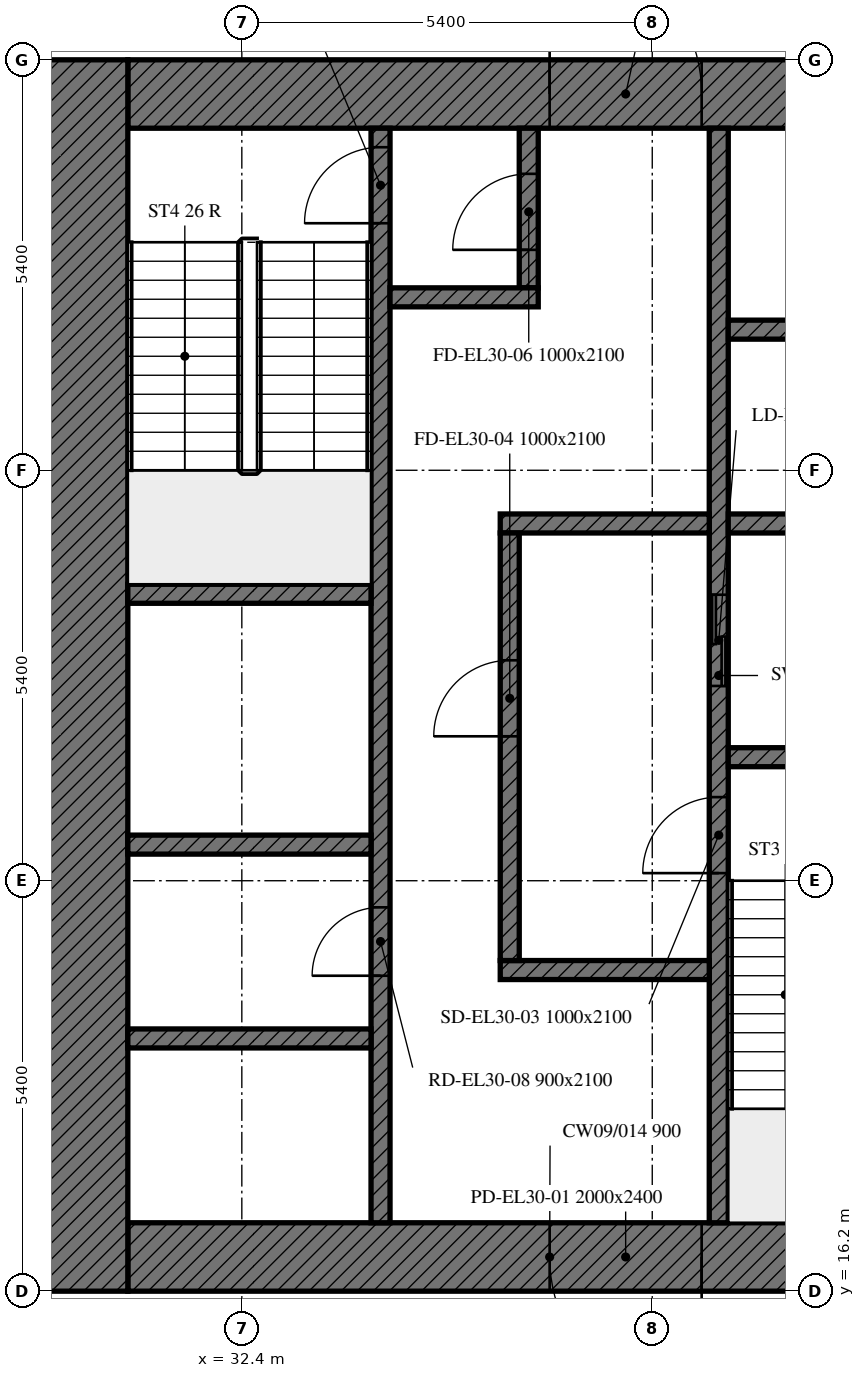
"""IFC4 building model, lengths in metres.
Left out: names, types, materials, properties, quantities, classifications, styles, units other than length and angle.
Written with IfcOpenShell. Run it as: python <this file> out.ifc"""

import sys

from ifc_helpers import new_model, si_unit, direction, frame, frame_2d, origin, place, context, subcontext, project, spatial, rectangle, extrude, element, fill, save


model = new_model("IFC4")
c1 = context("Model", 3, precision=1e-05, world=origin(), true_north=direction((0.0, 1.0)))
c2 = subcontext(c1, "Body", "Model", "MODEL_VIEW")
j1 = project(units=[si_unit("LENGTHUNIT", "METRE"), si_unit("PLANEANGLEUNIT", "RADIAN")], contexts=[c1])
p1 = place(None, origin())
s1 = spatial("IfcSite", under=j1, at=p1, CompositionType="ELEMENT")
p2 = place(p1, origin())
s2 = spatial("IfcBuilding", under=s1, at=p2, CompositionType="ELEMENT")
p3 = place(p2, frame((0.0, 0.0, 125.8)))
s3 = spatial("IfcBuildingStorey", under=s2, at=p3, CompositionType="ELEMENT", Elevation=125.8)
p4 = place(p3, frame((42.0, 16.65, 0.0), z_axis=(0.0, 0.0, 1.0), x_axis=(-1.0, 0.0, 0.0)))
e1 = element("IfcWall", 1, at=p4, inside=s3, PredefinedType="SOLIDWALL", context=c2, shape_type="SweptSolid", body=[
    extrude(rectangle(XDim=11.1, YDim=0.9, at=frame_2d((5.55, 0.0))), origin(), (0.0, 0.0, 1.0), 4.5),
])
p5 = place(p4, frame((3.55, 0.0, 0.0)))
e2 = element("IfcOpeningElement", 2, at=p5, cuts=e1, PredefinedType="OPENING", context=c2, shape_type="SweptSolid", body=[
    extrude(rectangle(XDim=2.0, YDim=2.4, at=frame_2d((1.0, 1.2))), frame((0.0, 0.45, 0.0), z_axis=(0.0, -1.0, 0.0), x_axis=(1.0, 0.0, 0.0)), (0.0, 0.0, 1.0), 0.9),
])
p6 = place(p3, frame((30.9, 31.95, 0.0), z_axis=(0.0, 0.0, 1.0), x_axis=(1.0, 0.0, 0.0)))
e3 = element("IfcWall", 3, at=p6, inside=s3, PredefinedType="SOLIDWALL", context=c2, shape_type="SweptSolid", body=[
    extrude(rectangle(XDim=11.1, YDim=0.9, at=frame_2d((5.55, 0.0))), origin(), (0.0, 0.0, 1.0), 4.5),
])
p7 = place(p6, frame((5.55, 0.0, 0.0)))
e4 = element("IfcOpeningElement", 4, at=p7, cuts=e3, PredefinedType="OPENING", context=c2, shape_type="SweptSolid", body=[
    extrude(rectangle(XDim=2.0, YDim=2.4, at=frame_2d((1.0, 1.2))), frame((0.0, 0.45, 0.0), z_axis=(0.0, -1.0, 0.0), x_axis=(1.0, 0.0, 0.0)), (0.0, 0.0, 1.0), 0.9),
])
p8 = place(p3, frame((30.3, 16.2, 0.0), z_axis=(0.0, 0.0, 1.0), x_axis=(0.0, 1.0, 0.0)))
e5 = element("IfcWall", 5, at=p8, inside=s3, PredefinedType="SOLIDWALL", context=c2, shape_type="SweptSolid", body=[
    extrude(rectangle(XDim=16.2, YDim=1.2, at=frame_2d((8.1, 0.0))), origin(), (0.0, 0.0, 1.0), 4.5),
])
p9 = place(p3, frame((38.675, 17.1, 0.0), z_axis=(0.0, 0.0, 1.0), x_axis=(0.0, 1.0, 0.0)))
e6 = element("IfcWall", 6, at=p9, inside=s3, PredefinedType="SOLIDWALL", context=c2, shape_type="SweptSolid", body=[
    extrude(rectangle(XDim=14.4, YDim=0.25, at=frame_2d((7.2, 0.0))), origin(), (0.0, 0.0, 1.0), 4.5),
])
p10 = place(p9, frame((4.6, 0.0, 0.0)))
e7 = element("IfcOpeningElement", 7, at=p10, cuts=e6, PredefinedType="OPENING", context=c2, shape_type="SweptSolid", body=[
    extrude(rectangle(XDim=1.0, YDim=2.1, at=frame_2d((0.5, 1.05))), frame((0.0, 0.125, 0.0), z_axis=(0.0, -1.0, 0.0), x_axis=(1.0, 0.0, 0.0)), (0.0, 0.0, 1.0), 0.25),
])
p11 = place(p9, frame((7.062, 0.0, 0.0)))
e8 = element("IfcOpeningElement", 8, at=p11, cuts=e6, PredefinedType="OPENING", context=c2, shape_type="SweptSolid", body=[
    extrude(rectangle(XDim=1.2, YDim=2.1, at=frame_2d((0.6, 1.05))), frame((0.0, 0.125, 0.0), z_axis=(0.0, -1.0, 0.0), x_axis=(1.0, 0.0, 0.0)), (0.0, 0.0, 1.0), 0.25),
])
p12 = place(p3, frame((34.225, 17.1, 0.0), z_axis=(0.0, 0.0, 1.0), x_axis=(0.0, 1.0, 0.0)))
e9 = element("IfcWall", 9, at=p12, inside=s3, PredefinedType="SOLIDWALL", context=c2, shape_type="SweptSolid", body=[
    extrude(rectangle(XDim=14.4, YDim=0.25, at=frame_2d((7.2, 0.0))), origin(), (0.0, 0.0, 1.0), 4.5),
])
p13 = place(p12, frame((13.15, 0.0, 0.0)))
e10 = element("IfcOpeningElement", 10, at=p13, cuts=e9, PredefinedType="OPENING", context=c2, shape_type="SweptSolid", body=[
    extrude(rectangle(XDim=1.0, YDim=2.1, at=frame_2d((0.5, 1.05))), frame((0.0, 0.125, 0.0), z_axis=(0.0, -1.0, 0.0), x_axis=(1.0, 0.0, 0.0)), (0.0, 0.0, 1.0), 0.25),
])
p14 = place(p12, frame((3.25, 0.0, 0.0)))
e11 = element("IfcOpeningElement", 11, at=p14, cuts=e9, PredefinedType="OPENING", context=c2, shape_type="SweptSolid", body=[
    extrude(rectangle(XDim=0.9, YDim=2.1, at=frame_2d((0.45, 1.05))), frame((0.0, 0.125, 0.0), z_axis=(0.0, -1.0, 0.0), x_axis=(1.0, 0.0, 0.0)), (0.0, 0.0, 1.0), 0.25),
])
p15 = place(p3, frame((38.8, 23.225, 0.0), z_axis=(0.0, 0.0, 1.0), x_axis=(1.0, 0.0, 0.0)))
e12 = element("IfcWall", 12, at=p15, inside=s3, PredefinedType="SOLIDWALL", context=c2, shape_type="SweptSolid", body=[
    extrude(rectangle(XDim=3.2, YDim=0.25, at=frame_2d((1.6, 0.0))), origin(), (0.0, 0.0, 1.0), 4.5),
])
for number, where, z_axis, x_axis in (
    (13, (30.9, 25.375, 0.0), (0.0, 0.0, 1.0), (1.0, 0.0, 0.0)),
    (14, (30.9, 22.075, 0.0), (0.0, 0.0, 1.0), (1.0, 0.0, 0.0)),
):
    element("IfcWall", number, at=place(p3, frame(where, z_axis=z_axis, x_axis=x_axis)), inside=s3, PredefinedType="SOLIDWALL", context=c2, shape_type="SweptSolid", body=[
        extrude(rectangle(XDim=3.2, YDim=0.25, at=frame_2d((1.6, 0.0))), origin(), (0.0, 0.0, 1.0), 4.5),
    ])
p16 = place(p3, frame((38.8, 26.3, 0.0), z_axis=(0.0, 0.0, 1.0), x_axis=(1.0, 0.0, 0.0)))
e15 = element("IfcWall", 15, at=p16, inside=s3, PredefinedType="SOLIDWALL", context=c2, shape_type="SweptSolid", body=[
    extrude(rectangle(XDim=3.2, YDim=0.25, at=frame_2d((1.6, 0.0))), origin(), (0.0, 0.0, 1.0), 4.5),
])
for number, where, z_axis, x_axis in (
    (16, (35.8, 26.3, 0.0), (0.0, 0.0, 1.0), (1.0, 0.0, 0.0)),
    (17, (35.8, 20.425, 0.0), (0.0, 0.0, 1.0), (1.0, 0.0, 0.0)),
):
    element("IfcWall", number, at=place(p3, frame(where, z_axis=z_axis, x_axis=x_axis)), inside=s3, PredefinedType="SOLIDWALL", context=c2, shape_type="SweptSolid", body=[
        extrude(rectangle(XDim=2.75, YDim=0.25, at=frame_2d((1.375, 0.0))), origin(), (0.0, 0.0, 1.0), 4.5),
    ])
p17 = place(p3, frame((36.175, 29.4, 0.0), z_axis=(0.0, 0.0, 1.0), x_axis=(0.0, 1.0, 0.0)))
e18 = element("IfcWall", 18, at=p17, inside=s3, PredefinedType="SOLIDWALL", context=c2, shape_type="SweptSolid", body=[
    extrude(rectangle(XDim=2.1, YDim=0.25, at=frame_2d((1.05, 0.0))), origin(), (0.0, 0.0, 1.0), 4.5),
])
p18 = place(p17, frame((0.5, 0.0, 0.0)))
e19 = element("IfcOpeningElement", 19, at=p18, cuts=e18, PredefinedType="OPENING", context=c2, shape_type="SweptSolid", body=[
    extrude(rectangle(XDim=1.0, YDim=2.1, at=frame_2d((0.5, 1.05))), frame((0.0, 0.125, 0.0), z_axis=(0.0, -1.0, 0.0), x_axis=(1.0, 0.0, 0.0)), (0.0, 0.0, 1.0), 0.25),
])
p19 = place(p3, frame((34.35, 29.275, 0.0), z_axis=(0.0, 0.0, 1.0), x_axis=(1.0, 0.0, 0.0)))
e20 = element("IfcWall", 20, at=p19, inside=s3, PredefinedType="SOLIDWALL", context=c2, shape_type="SweptSolid", body=[
    extrude(rectangle(XDim=1.95, YDim=0.25, at=frame_2d((0.975, 0.0))), origin(), (0.0, 0.0, 1.0), 4.5),
])
p20 = place(p3, frame((35.925, 20.55, 0.0), z_axis=(0.0, 0.0, 1.0), x_axis=(0.0, 1.0, 0.0)))
e21 = element("IfcWall", 21, at=p20, inside=s3, PredefinedType="SOLIDWALL", context=c2, shape_type="SweptSolid", body=[
    extrude(rectangle(XDim=5.625, YDim=0.25, at=frame_2d((2.812, 0.0))), origin(), (0.0, 0.0, 1.0), 4.5),
])
p21 = place(p20, frame((2.95, 0.0, 0.0)))
e22 = element("IfcOpeningElement", 22, at=p21, cuts=e21, PredefinedType="OPENING", context=c2, shape_type="SweptSolid", body=[
    extrude(rectangle(XDim=1.0, YDim=2.1, at=frame_2d((0.5, 1.05))), frame((0.0, 0.125, 0.0), z_axis=(0.0, -1.0, 0.0), x_axis=(1.0, 0.0, 0.0)), (0.0, 0.0, 1.0), 0.25),
])
p22 = place(p3, frame((38.8, 28.85, 0.0), z_axis=(0.0, 0.0, 1.0), x_axis=(1.0, 0.0, 0.0)))
e23 = element("IfcWall", 23, at=p22, inside=s3, PredefinedType="SOLIDWALL", context=c2, shape_type="SweptSolid", body=[
    extrude(rectangle(XDim=3.2, YDim=0.25, at=frame_2d((1.6, 0.0))), origin(), (0.0, 0.0, 1.0), 4.5),
])
p23 = place(p3, frame((30.9, 19.525, 0.0), z_axis=(0.0, 0.0, 1.0), x_axis=(1.0, 0.0, 0.0)))
e24 = element("IfcWall", 24, at=p23, inside=s3, PredefinedType="SOLIDWALL", context=c2, shape_type="SweptSolid", body=[
    extrude(rectangle(XDim=3.2, YDim=0.25, at=frame_2d((1.6, 0.0))), origin(), (0.0, 0.0, 1.0), 4.5),
])
p24 = place(p5, origin())
e25 = element("IfcDoor", 25, at=p24, inside=s3, OperationType="DOUBLE_DOOR_SINGLE_SWING", PredefinedType="DOOR", context=c2, shape_type="SweptSolid", body=[
    extrude(rectangle(XDim=2.0, YDim=2.4, at=frame_2d((1.0, 1.2))), frame((0.0, 0.025, 0.0), z_axis=(0.0, -1.0, 0.0), x_axis=(1.0, 0.0, 0.0)), (0.0, 0.0, 1.0), 0.05),
])
fill(e2, e25)
p25 = place(p7, origin())
e26 = element("IfcDoor", 26, at=p25, inside=s3, OperationType="DOUBLE_DOOR_SINGLE_SWING", PredefinedType="DOOR", context=c2, shape_type="SweptSolid", body=[
    extrude(rectangle(XDim=2.0, YDim=2.4, at=frame_2d((1.0, 1.2))), frame((0.0, 0.025, 0.0), z_axis=(0.0, -1.0, 0.0), x_axis=(1.0, 0.0, 0.0)), (0.0, 0.0, 1.0), 0.05),
])
fill(e4, e26)
p26 = place(p10, origin())
e27 = element("IfcDoor", 27, at=p26, inside=s3, OperationType="SINGLE_SWING_LEFT", PredefinedType="DOOR", context=c2, shape_type="SweptSolid", body=[
    extrude(rectangle(XDim=1.0, YDim=2.1, at=frame_2d((0.5, 1.05))), frame((0.0, 0.025, 0.0), z_axis=(0.0, -1.0, 0.0), x_axis=(1.0, 0.0, 0.0)), (0.0, 0.0, 1.0), 0.05),
])
fill(e7, e27)
p27 = place(p21, origin())
e28 = element("IfcDoor", 28, at=p27, inside=s3, OperationType="SINGLE_SWING_LEFT", PredefinedType="DOOR", context=c2, shape_type="SweptSolid", body=[
    extrude(rectangle(XDim=1.0, YDim=2.1, at=frame_2d((0.5, 1.05))), frame((0.0, 0.025, 0.0), z_axis=(0.0, -1.0, 0.0), x_axis=(1.0, 0.0, 0.0)), (0.0, 0.0, 1.0), 0.05),
])
fill(e22, e28)
p28 = place(p13, origin())
e29 = element("IfcDoor", 29, at=p28, inside=s3, OperationType="SINGLE_SWING_LEFT", PredefinedType="DOOR", context=c2, shape_type="SweptSolid", body=[
    extrude(rectangle(XDim=1.0, YDim=2.1, at=frame_2d((0.5, 1.05))), frame((0.0, 0.025, 0.0), z_axis=(0.0, -1.0, 0.0), x_axis=(1.0, 0.0, 0.0)), (0.0, 0.0, 1.0), 0.05),
])
fill(e10, e29)
p29 = place(p18, origin())
e30 = element("IfcDoor", 30, at=p29, inside=s3, OperationType="SINGLE_SWING_LEFT", PredefinedType="DOOR", context=c2, shape_type="SweptSolid", body=[
    extrude(rectangle(XDim=1.0, YDim=2.1, at=frame_2d((0.5, 1.05))), frame((0.0, 0.025, 0.0), z_axis=(0.0, -1.0, 0.0), x_axis=(1.0, 0.0, 0.0)), (0.0, 0.0, 1.0), 0.05),
])
fill(e19, e30)
p30 = place(p11, origin())
e31 = element("IfcDoor", 31, at=p30, inside=s3, OperationType="DOUBLE_DOOR_SLIDING", PredefinedType="DOOR", context=c2, shape_type="SweptSolid", body=[
    extrude(rectangle(XDim=1.2, YDim=2.1, at=frame_2d((0.6, 1.05))), frame((0.0, 0.025, 0.0), z_axis=(0.0, -1.0, 0.0), x_axis=(1.0, 0.0, 0.0)), (0.0, 0.0, 1.0), 0.05),
])
fill(e8, e31)
p31 = place(p14, origin())
e32 = element("IfcDoor", 32, at=p31, inside=s3, OperationType="SINGLE_SWING_LEFT", PredefinedType="DOOR", context=c2, shape_type="SweptSolid", body=[
    extrude(rectangle(XDim=0.9, YDim=2.1, at=frame_2d((0.45, 1.05))), frame((0.0, 0.025, 0.0), z_axis=(0.0, -1.0, 0.0), x_axis=(1.0, 0.0, 0.0)), (0.0, 0.0, 1.0), 0.05),
])
fill(e11, e32)
save(model, sys.argv[1])
